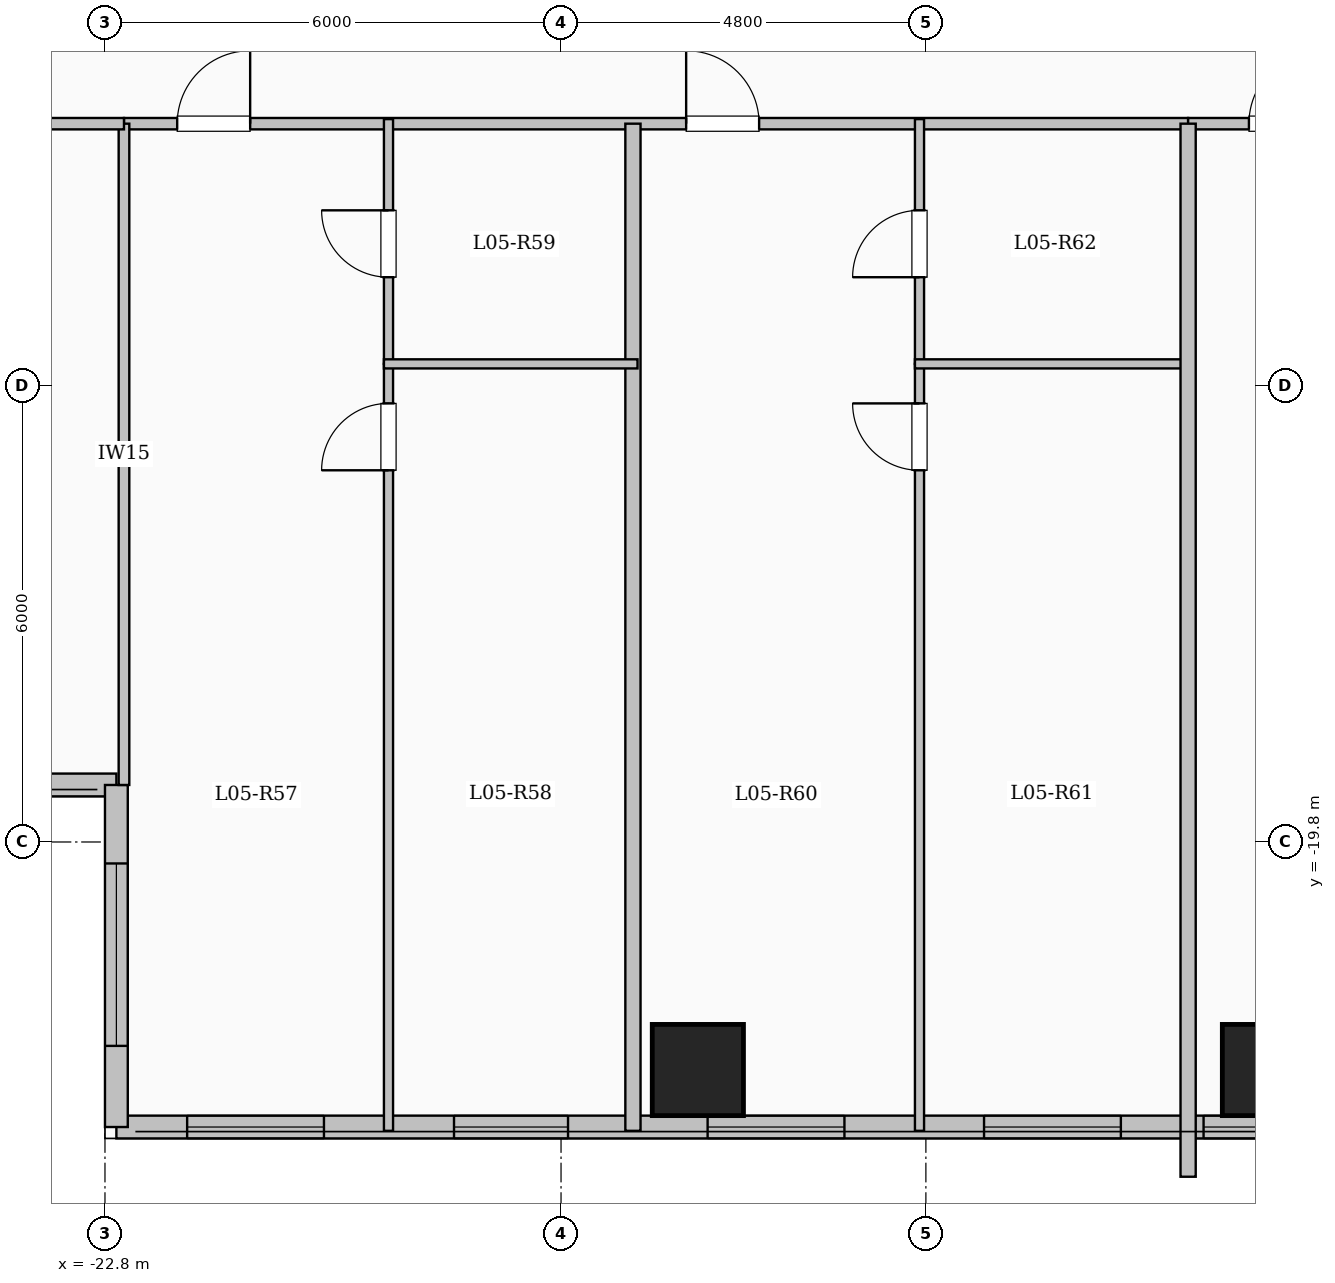
"""IFC4 building model, lengths in metres.
Left out: names, types, materials, properties, quantities, classifications, styles, units other than length and angle.
Written with IfcOpenShell. Run it as: python <this file> out.ifc"""

import sys

from ifc_helpers import new_model, si_unit, direction, frame, frame_2d, origin, origin_2d, place, context, subcontext, project, spatial, rectangle, extrude, element, fill, save


model = new_model("IFC4")
c1 = context("Model", 3, precision=1e-05, world=origin(), true_north=direction((0.0, 1.0)))
c2 = subcontext(c1, "Body", "Model", "MODEL_VIEW")
j1 = project(units=[si_unit("LENGTHUNIT", "METRE"), si_unit("PLANEANGLEUNIT", "RADIAN")], contexts=[c1])
p1 = place(None, origin())
s1 = spatial("IfcSite", under=j1, at=p1, CompositionType="ELEMENT")
p2 = place(p1, origin())
s2 = spatial("IfcBuilding", under=s1, at=p2, CompositionType="ELEMENT")
p3 = place(p2, frame((0.0, 0.0, 24.0)))
s3 = spatial("IfcBuildingStorey", under=s2, at=p3, CompositionType="ELEMENT", Elevation=24.0)
for number, where, z_axis, x_axis in (
    (1, (-15.0, -22.8, 0.0), (0.0, 0.0, 1.0), (1.0, 0.0, 0.0)),
    (2, (-7.5, -22.8, 0.0), (0.0, 0.0, 1.0), (1.0, 0.0, 0.0)),
):
    element("IfcColumn", number, at=place(p3, frame(where, z_axis=z_axis, x_axis=x_axis)), inside=s3, PredefinedType="COLUMN", context=c2, shape_type="SweptSolid", body=[
        extrude(rectangle(XDim=1.2, YDim=1.2, at=origin_2d()), origin(), (0.0, 0.0, 1.0), 3.35),
    ])
p4 = place(p3, frame((-22.65, -19.05, 0.0), z_axis=(0.0, 0.0, 1.0), x_axis=(-1.0, 0.0, 0.0)))
e3 = element("IfcWall", 3, at=p4, inside=s3, PredefinedType="SOLIDWALL", context=c2, shape_type="SweptSolid", body=[
    extrude(rectangle(XDim=6.0, YDim=0.3, at=frame_2d((3.0, 0.0))), origin(), (0.0, 0.0, 1.0), 3.1),
])
p5 = place(p4, frame((1.775, 0.0, 0.9)))
e4 = element("IfcOpeningElement", 4, at=p5, cuts=e3, PredefinedType="OPENING", context=c2, shape_type="SweptSolid", body=[
    extrude(rectangle(XDim=2.4, YDim=1.8, at=frame_2d((1.2, 0.9))), frame((0.0, 0.16, 0.0), z_axis=(0.0, -1.0, 0.0), x_axis=(1.0, 0.0, 0.0)), (0.0, 0.0, 1.0), 0.32),
])
p6 = place(p3, frame((-7.35, -23.55, 0.0), z_axis=(0.0, 0.0, 1.0), x_axis=(-1.0, 0.0, 0.0)))
e5 = element("IfcWall", 5, at=p6, inside=s3, PredefinedType="SOLIDWALL", context=c2, shape_type="SweptSolid", body=[
    extrude(rectangle(XDim=15.3, YDim=0.3, at=frame_2d((7.65, 0.0))), origin(), (0.0, 0.0, 1.0), 3.1),
])
p7 = place(p6, frame((0.147, 0.0, 0.95)))
e6 = element("IfcOpeningElement", 6, at=p7, cuts=e5, PredefinedType="OPENING", context=c2, shape_type="SweptSolid", body=[
    extrude(rectangle(XDim=0.85, YDim=1.5, at=frame_2d((0.425, 0.75))), frame((0.0, 0.16, 0.0), z_axis=(0.0, -1.0, 0.0), x_axis=(1.0, 0.0, 0.0)), (0.0, 0.0, 1.0), 0.32),
])
p8 = place(p6, frame((2.085, 0.0, 0.9)))
e7 = element("IfcOpeningElement", 7, at=p8, cuts=e5, PredefinedType="OPENING", context=c2, shape_type="SweptSolid", body=[
    extrude(rectangle(XDim=1.8, YDim=1.65, at=frame_2d((0.9, 0.825))), frame((0.0, 0.16, 0.0), z_axis=(0.0, -1.0, 0.0), x_axis=(1.0, 0.0, 0.0)), (0.0, 0.0, 1.0), 0.32),
])
p9 = place(p6, frame((5.722, 0.0, 0.9)))
e8 = element("IfcOpeningElement", 8, at=p9, cuts=e5, PredefinedType="OPENING", context=c2, shape_type="SweptSolid", body=[
    extrude(rectangle(XDim=1.8, YDim=1.65, at=frame_2d((0.9, 0.825))), frame((0.0, 0.16, 0.0), z_axis=(0.0, -1.0, 0.0), x_axis=(1.0, 0.0, 0.0)), (0.0, 0.0, 1.0), 0.32),
])
p10 = place(p6, frame((9.358, 0.0, 0.9)))
e9 = element("IfcOpeningElement", 9, at=p10, cuts=e5, PredefinedType="OPENING", context=c2, shape_type="SweptSolid", body=[
    extrude(rectangle(XDim=1.5, YDim=1.65, at=frame_2d((0.75, 0.825))), frame((0.0, 0.16, 0.0), z_axis=(0.0, -1.0, 0.0), x_axis=(1.0, 0.0, 0.0)), (0.0, 0.0, 1.0), 0.32),
])
p11 = place(p6, frame((12.569, 0.0, 0.9)))
e10 = element("IfcOpeningElement", 10, at=p11, cuts=e5, PredefinedType="OPENING", context=c2, shape_type="SweptSolid", body=[
    extrude(rectangle(XDim=1.8, YDim=1.65, at=frame_2d((0.9, 0.825))), frame((0.0, 0.16, 0.0), z_axis=(0.0, -1.0, 0.0), x_axis=(1.0, 0.0, 0.0)), (0.0, 0.0, 1.0), 0.32),
])
p12 = place(p3, frame((-22.65, -23.55, 0.0), z_axis=(0.0, 0.0, 1.0), x_axis=(0.0, 1.0, 0.0)))
e11 = element("IfcWall", 11, at=p12, inside=s3, PredefinedType="SOLIDWALL", context=c2, shape_type="SweptSolid", body=[
    extrude(rectangle(XDim=4.5, YDim=0.3, at=frame_2d((2.25, 0.0))), origin(), (0.0, 0.0, 1.0), 3.1),
])
p13 = place(p12, frame((1.067, 0.0, 0.9)))
e12 = element("IfcOpeningElement", 12, at=p13, cuts=e11, PredefinedType="OPENING", context=c2, shape_type="SweptSolid", body=[
    extrude(rectangle(XDim=2.4, YDim=1.8, at=frame_2d((1.2, 0.9))), frame((0.0, 0.16, 0.0), z_axis=(0.0, -1.0, 0.0), x_axis=(1.0, 0.0, 0.0)), (0.0, 0.0, 1.0), 0.32),
])
p14 = place(p3, frame((-22.55, -10.35, 0.0), z_axis=(0.0, 0.0, 1.0), x_axis=(1.0, 0.0, 0.0)))
e13 = element("IfcWall", 13, at=p14, inside=s3, PredefinedType="PARTITIONING", context=c2, shape_type="SweptSolid", body=[
    extrude(rectangle(XDim=14.0, YDim=0.15, at=frame_2d((7.0, 0.0))), origin(), (0.0, 0.0, 1.0), 3.1),
])
p15 = place(p14, frame((0.7, 0.0, 0.0)))
e14 = element("IfcOpeningElement", 14, at=p15, cuts=e13, PredefinedType="OPENING", context=c2, shape_type="SweptSolid", body=[
    extrude(rectangle(XDim=0.96, YDim=2.15, at=frame_2d((0.48, 1.075))), frame((0.0, 0.085, 0.0), z_axis=(0.0, -1.0, 0.0), x_axis=(1.0, 0.0, 0.0)), (0.0, 0.0, 1.0), 0.17),
])
p16 = place(p14, frame((7.396, 0.0, 0.0)))
e15 = element("IfcOpeningElement", 15, at=p16, cuts=e13, PredefinedType="OPENING", context=c2, shape_type="SweptSolid", body=[
    extrude(rectangle(XDim=0.96, YDim=2.15, at=frame_2d((0.48, 1.075))), frame((0.0, 0.085, 0.0), z_axis=(0.0, -1.0, 0.0), x_axis=(1.0, 0.0, 0.0)), (0.0, 0.0, 1.0), 0.17),
])
p17 = place(p3, frame((-8.55, -10.35, 0.0), z_axis=(0.0, 0.0, 1.0), x_axis=(1.0, 0.0, 0.0)))
e16 = element("IfcWall", 16, at=p17, inside=s3, PredefinedType="PARTITIONING", context=c2, shape_type="SweptSolid", body=[
    extrude(rectangle(XDim=17.1, YDim=0.15, at=frame_2d((8.55, 0.0))), origin(), (0.0, 0.0, 1.0), 3.1),
])
p18 = place(p17, frame((0.8, 0.0, 0.0)))
e17 = element("IfcOpeningElement", 17, at=p18, cuts=e16, PredefinedType="OPENING", context=c2, shape_type="SweptSolid", body=[
    extrude(rectangle(XDim=0.96, YDim=2.15, at=frame_2d((0.48, 1.075))), frame((0.0, 0.085, 0.0), z_axis=(0.0, -1.0, 0.0), x_axis=(1.0, 0.0, 0.0)), (0.0, 0.0, 1.0), 0.17),
])
p19 = place(p17, frame((9.35, 0.0, 0.0)))
e18 = element("IfcOpeningElement", 18, at=p19, cuts=e16, PredefinedType="OPENING", context=c2, shape_type="SweptSolid", body=[
    extrude(rectangle(XDim=0.96, YDim=2.15, at=frame_2d((0.48, 1.075))), frame((0.0, 0.085, 0.0), z_axis=(0.0, -1.0, 0.0), x_axis=(1.0, 0.0, 0.0)), (0.0, 0.0, 1.0), 0.17),
])
p20 = place(p3, frame((-15.854, -23.6, 0.0), z_axis=(0.0, 0.0, 1.0), x_axis=(0.0, 1.0, 0.0)))
e19 = element("IfcWall", 19, at=p20, inside=s3, PredefinedType="SOLIDWALL", context=c2, shape_type="SweptSolid", body=[
    extrude(rectangle(XDim=13.25, YDim=0.2, at=frame_2d((6.625, 0.0))), origin(), (0.0, 0.0, 1.0), 3.1),
])
p21 = place(p3, frame((-19.07, -23.6, 0.0), z_axis=(0.0, 0.0, 1.0), x_axis=(0.0, 1.0, 0.0)))
e20 = element("IfcWall", 20, at=p21, inside=s3, PredefinedType="PARTITIONING", context=c2, shape_type="SweptSolid", body=[
    extrude(rectangle(XDim=10.09, YDim=0.12, at=frame_2d((5.045, 0.0))), origin(), (0.0, 0.0, 1.0), 3.1),
])
p22 = place(p21, frame((8.69, 0.0, 0.0)))
e21 = element("IfcOpeningElement", 21, at=p22, cuts=e20, PredefinedType="OPENING", context=c2, shape_type="SweptSolid", body=[
    extrude(rectangle(XDim=0.88, YDim=2.1, at=frame_2d((0.44, 1.05))), frame((0.0, 0.07, 0.0), z_axis=(0.0, -1.0, 0.0), x_axis=(1.0, 0.0, 0.0)), (0.0, 0.0, 1.0), 0.14),
])
p23 = place(p3, frame((-19.07, -13.51, 0.0), z_axis=(0.0, 0.0, 1.0), x_axis=(0.0, 1.0, 0.0)))
e22 = element("IfcWall", 22, at=p23, inside=s3, PredefinedType="PARTITIONING", context=c2, shape_type="SweptSolid", body=[
    extrude(rectangle(XDim=3.22, YDim=0.12, at=frame_2d((1.61, 0.0))), origin(), (0.0, 0.0, 1.0), 3.1),
])
p24 = place(p23, frame((1.14, 0.0, 0.0)))
e23 = element("IfcOpeningElement", 23, at=p24, cuts=e22, PredefinedType="OPENING", context=c2, shape_type="SweptSolid", body=[
    extrude(rectangle(XDim=0.88, YDim=2.1, at=frame_2d((0.44, 1.05))), frame((0.0, 0.07, 0.0), z_axis=(0.0, -1.0, 0.0), x_axis=(1.0, 0.0, 0.0)), (0.0, 0.0, 1.0), 0.14),
])
p25 = place(p3, frame((-19.13, -13.51, 0.0), z_axis=(0.0, 0.0, 1.0), x_axis=(1.0, 0.0, 0.0)))
e24 = element("IfcWall", 24, at=p25, inside=s3, PredefinedType="PARTITIONING", context=c2, shape_type="SweptSolid", body=[
    extrude(rectangle(XDim=3.336, YDim=0.12, at=frame_2d((1.668, 0.0))), origin(), (0.0, 0.0, 1.0), 3.1),
])
p26 = place(p3, frame((-12.084, -23.6, 0.0), z_axis=(0.0, 0.0, 1.0), x_axis=(0.0, 1.0, 0.0)))
e25 = element("IfcWall", 25, at=p26, inside=s3, PredefinedType="PARTITIONING", context=c2, shape_type="SweptSolid", body=[
    extrude(rectangle(XDim=10.09, YDim=0.12, at=frame_2d((5.045, 0.0))), origin(), (0.0, 0.0, 1.0), 3.1),
])
p27 = place(p26, frame((8.69, 0.0, 0.0)))
e26 = element("IfcOpeningElement", 26, at=p27, cuts=e25, PredefinedType="OPENING", context=c2, shape_type="SweptSolid", body=[
    extrude(rectangle(XDim=0.88, YDim=2.1, at=frame_2d((0.44, 1.05))), frame((0.0, 0.07, 0.0), z_axis=(0.0, -1.0, 0.0), x_axis=(1.0, 0.0, 0.0)), (0.0, 0.0, 1.0), 0.14),
])
p28 = place(p3, frame((-12.084, -13.51, 0.0), z_axis=(0.0, 0.0, 1.0), x_axis=(0.0, 1.0, 0.0)))
e27 = element("IfcWall", 27, at=p28, inside=s3, PredefinedType="PARTITIONING", context=c2, shape_type="SweptSolid", body=[
    extrude(rectangle(XDim=3.22, YDim=0.12, at=frame_2d((1.61, 0.0))), origin(), (0.0, 0.0, 1.0), 3.1),
])
p29 = place(p28, frame((1.14, 0.0, 0.0)))
e28 = element("IfcOpeningElement", 28, at=p29, cuts=e27, PredefinedType="OPENING", context=c2, shape_type="SweptSolid", body=[
    extrude(rectangle(XDim=0.88, YDim=2.1, at=frame_2d((0.44, 1.05))), frame((0.0, 0.07, 0.0), z_axis=(0.0, -1.0, 0.0), x_axis=(1.0, 0.0, 0.0)), (0.0, 0.0, 1.0), 0.14),
])
p30 = place(p3, frame((-12.144, -13.51, 0.0), z_axis=(0.0, 0.0, 1.0), x_axis=(1.0, 0.0, 0.0)))
e29 = element("IfcWall", 29, at=p30, inside=s3, PredefinedType="PARTITIONING", context=c2, shape_type="SweptSolid", body=[
    extrude(rectangle(XDim=3.604, YDim=0.12, at=frame_2d((1.802, 0.0))), origin(), (0.0, 0.0, 1.0), 3.1),
])
p31 = place(p3, frame((-8.55, -24.204, 0.0), z_axis=(0.0, 0.0, 1.0), x_axis=(0.0, 1.0, 0.0)))
e30 = element("IfcWall", 30, at=p31, inside=s3, PredefinedType="SOLIDWALL", context=c2, shape_type="SweptSolid", body=[
    extrude(rectangle(XDim=13.854, YDim=0.2, at=frame_2d((6.927, 0.0))), origin(), (0.0, 0.0, 1.0), 3.1),
])
p32 = place(p3, frame((-22.55, -19.05, 0.0), z_axis=(0.0, 0.0, 1.0), x_axis=(0.0, 1.0, 0.0)))
e31 = element("IfcWall", 31, at=p32, inside=s3, PredefinedType="PARTITIONING", context=c2, shape_type="SweptSolid", body=[
    extrude(rectangle(XDim=8.7, YDim=0.14, at=frame_2d((4.35, 0.0))), origin(), (0.0, 0.0, 1.0), 3.1),
])
p33 = place(p3, frame((-28.68, -10.35, 0.0), z_axis=(0.0, 0.0, 1.0), x_axis=(1.0, 0.0, 0.0)))
e32 = element("IfcWall", 32, at=p33, inside=s3, PredefinedType="PARTITIONING", context=c2, shape_type="SweptSolid", body=[
    extrude(rectangle(XDim=6.13, YDim=0.15, at=frame_2d((3.065, 0.0))), origin(), (0.0, 0.0, 1.0), 3.1),
])
p34 = place(p33, frame((2.59, 0.0, 0.0)))
e33 = element("IfcOpeningElement", 33, at=p34, cuts=e32, PredefinedType="OPENING", context=c2, shape_type="SweptSolid", body=[
    extrude(rectangle(XDim=0.95, YDim=2.15, at=frame_2d((0.475, 1.075))), frame((0.0, 0.085, 0.0), z_axis=(0.0, -1.0, 0.0), x_axis=(1.0, 0.0, 0.0)), (0.0, 0.0, 1.0), 0.17),
])
p35 = place(p7, origin())
e34 = element("IfcWindow", 34, at=p35, inside=s3, PartitioningType="SINGLE_PANEL", PredefinedType="WINDOW", context=c2, shape_type="SweptSolid", body=[
    extrude(rectangle(XDim=0.85, YDim=1.5, at=frame_2d((0.425, 0.75))), frame((0.0, 0.03, 0.0), z_axis=(0.0, -1.0, 0.0), x_axis=(1.0, 0.0, 0.0)), (0.0, 0.0, 1.0), 0.06),
])
fill(e6, e34)
p36 = place(p8, origin())
e35 = element("IfcWindow", 35, at=p36, inside=s3, PartitioningType="SINGLE_PANEL", PredefinedType="WINDOW", context=c2, shape_type="SweptSolid", body=[
    extrude(rectangle(XDim=1.8, YDim=1.65, at=frame_2d((0.9, 0.825))), frame((0.0, 0.03, 0.0), z_axis=(0.0, -1.0, 0.0), x_axis=(1.0, 0.0, 0.0)), (0.0, 0.0, 1.0), 0.06),
])
fill(e7, e35)
p37 = place(p9, origin())
e36 = element("IfcWindow", 36, at=p37, inside=s3, PartitioningType="SINGLE_PANEL", PredefinedType="WINDOW", context=c2, shape_type="SweptSolid", body=[
    extrude(rectangle(XDim=1.8, YDim=1.65, at=frame_2d((0.9, 0.825))), frame((0.0, 0.03, 0.0), z_axis=(0.0, -1.0, 0.0), x_axis=(1.0, 0.0, 0.0)), (0.0, 0.0, 1.0), 0.06),
])
fill(e8, e36)
p38 = place(p10, origin())
e37 = element("IfcWindow", 37, at=p38, inside=s3, PartitioningType="SINGLE_PANEL", PredefinedType="WINDOW", context=c2, shape_type="SweptSolid", body=[
    extrude(rectangle(XDim=1.5, YDim=1.65, at=frame_2d((0.75, 0.825))), frame((0.0, 0.03, 0.0), z_axis=(0.0, -1.0, 0.0), x_axis=(1.0, 0.0, 0.0)), (0.0, 0.0, 1.0), 0.06),
])
fill(e9, e37)
p39 = place(p11, origin())
e38 = element("IfcWindow", 38, at=p39, inside=s3, PartitioningType="SINGLE_PANEL", PredefinedType="WINDOW", context=c2, shape_type="SweptSolid", body=[
    extrude(rectangle(XDim=1.8, YDim=1.65, at=frame_2d((0.9, 0.825))), frame((0.0, 0.03, 0.0), z_axis=(0.0, -1.0, 0.0), x_axis=(1.0, 0.0, 0.0)), (0.0, 0.0, 1.0), 0.06),
])
fill(e10, e38)
p40 = place(p13, origin())
e39 = element("IfcWindow", 39, at=p40, inside=s3, PartitioningType="SINGLE_PANEL", PredefinedType="WINDOW", context=c2, shape_type="SweptSolid", body=[
    extrude(rectangle(XDim=2.4, YDim=1.8, at=frame_2d((1.2, 0.9))), frame((0.0, 0.03, 0.0), z_axis=(0.0, -1.0, 0.0), x_axis=(1.0, 0.0, 0.0)), (0.0, 0.0, 1.0), 0.06),
])
fill(e12, e39)
p41 = place(p15, origin())
e40 = element("IfcDoor", 40, at=p41, inside=s3, OperationType="SINGLE_SWING_RIGHT", PredefinedType="DOOR", context=c2, shape_type="SweptSolid", body=[
    extrude(rectangle(XDim=0.96, YDim=2.15, at=frame_2d((0.48, 1.075))), frame((0.0, 0.025, 0.0), z_axis=(0.0, -1.0, 0.0), x_axis=(1.0, 0.0, 0.0)), (0.0, 0.0, 1.0), 0.05),
])
fill(e14, e40)
p42 = place(p22, origin())
e41 = element("IfcDoor", 41, at=p42, inside=s3, OperationType="SINGLE_SWING_LEFT", PredefinedType="DOOR", context=c2, shape_type="SweptSolid", body=[
    extrude(rectangle(XDim=0.88, YDim=2.1, at=frame_2d((0.44, 1.05))), frame((0.0, 0.025, 0.0), z_axis=(0.0, -1.0, 0.0), x_axis=(1.0, 0.0, 0.0)), (0.0, 0.0, 1.0), 0.05),
])
fill(e21, e41)
p43 = place(p24, origin())
e42 = element("IfcDoor", 42, at=p43, inside=s3, OperationType="SINGLE_SWING_RIGHT", PredefinedType="DOOR", context=c2, shape_type="SweptSolid", body=[
    extrude(rectangle(XDim=0.88, YDim=2.1, at=frame_2d((0.44, 1.05))), frame((0.0, 0.025, 0.0), z_axis=(0.0, -1.0, 0.0), x_axis=(1.0, 0.0, 0.0)), (0.0, 0.0, 1.0), 0.05),
])
fill(e23, e42)
p44 = place(p16, origin())
e43 = element("IfcDoor", 43, at=p44, inside=s3, OperationType="SINGLE_SWING_LEFT", PredefinedType="DOOR", context=c2, shape_type="SweptSolid", body=[
    extrude(rectangle(XDim=0.96, YDim=2.15, at=frame_2d((0.48, 1.075))), frame((0.0, 0.025, 0.0), z_axis=(0.0, -1.0, 0.0), x_axis=(1.0, 0.0, 0.0)), (0.0, 0.0, 1.0), 0.05),
])
fill(e15, e43)
p45 = place(p27, origin())
e44 = element("IfcDoor", 44, at=p45, inside=s3, OperationType="SINGLE_SWING_RIGHT", PredefinedType="DOOR", context=c2, shape_type="SweptSolid", body=[
    extrude(rectangle(XDim=0.88, YDim=2.1, at=frame_2d((0.44, 1.05))), frame((0.0, 0.025, 0.0), z_axis=(0.0, -1.0, 0.0), x_axis=(1.0, 0.0, 0.0)), (0.0, 0.0, 1.0), 0.05),
])
fill(e26, e44)
p46 = place(p29, origin())
e45 = element("IfcDoor", 45, at=p46, inside=s3, OperationType="SINGLE_SWING_LEFT", PredefinedType="DOOR", context=c2, shape_type="SweptSolid", body=[
    extrude(rectangle(XDim=0.88, YDim=2.1, at=frame_2d((0.44, 1.05))), frame((0.0, 0.025, 0.0), z_axis=(0.0, -1.0, 0.0), x_axis=(1.0, 0.0, 0.0)), (0.0, 0.0, 1.0), 0.05),
])
fill(e28, e45)
p47 = place(p18, origin())
e46 = element("IfcDoor", 46, at=p47, inside=s3, OperationType="SINGLE_SWING_RIGHT", PredefinedType="DOOR", context=c2, shape_type="SweptSolid", body=[
    extrude(rectangle(XDim=0.96, YDim=2.15, at=frame_2d((0.48, 1.075))), frame((0.0, 0.025, 0.0), z_axis=(0.0, -1.0, 0.0), x_axis=(1.0, 0.0, 0.0)), (0.0, 0.0, 1.0), 0.05),
])
fill(e17, e46)
save(model, sys.argv[1])
